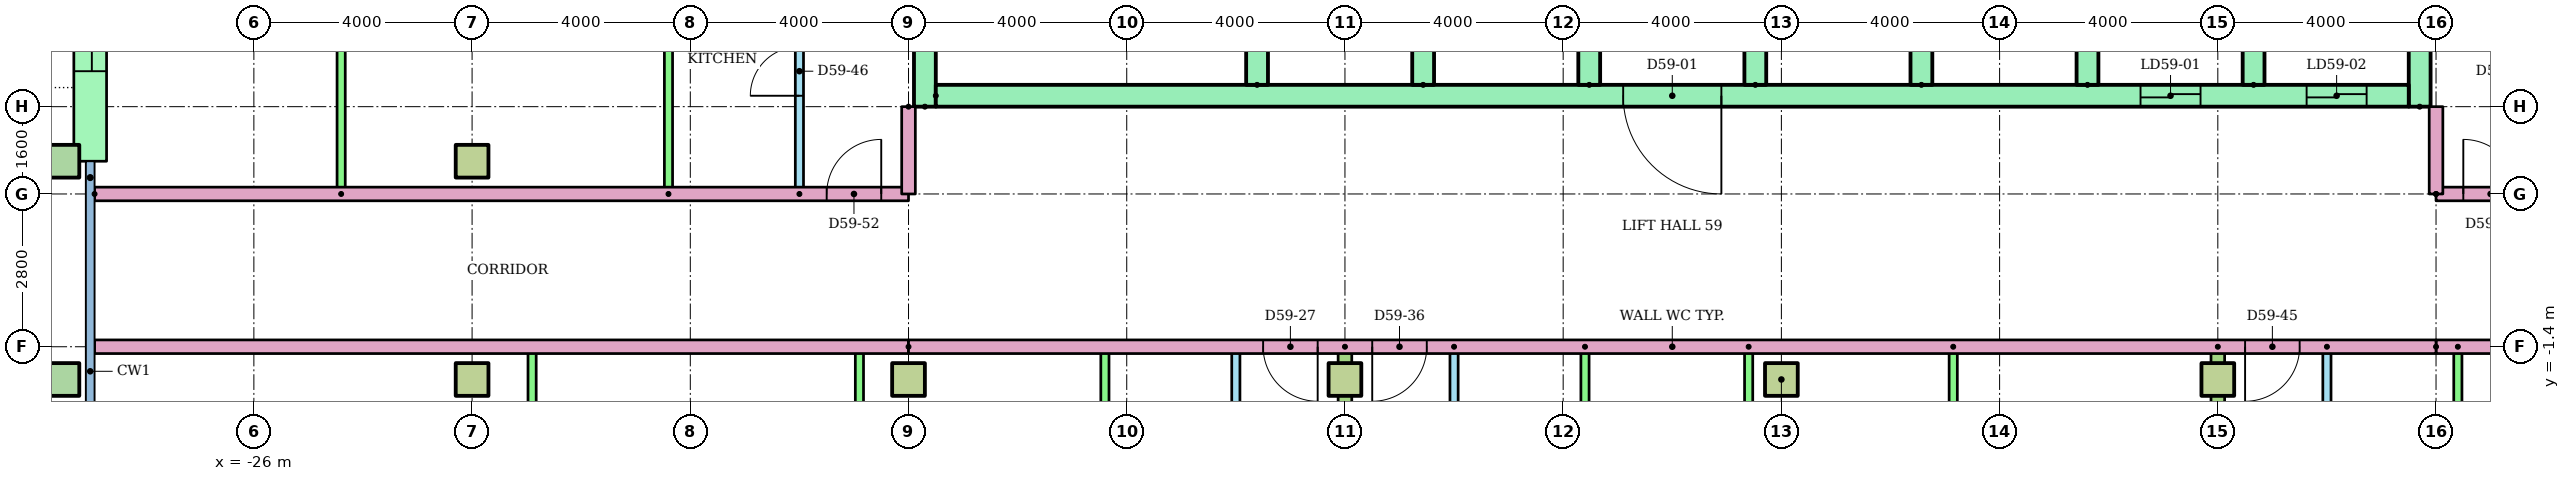
"""IFC4 building model, lengths in metres.
Left out: names, types, materials, properties, quantities, classifications, styles, units other than length and angle.
Written with IfcOpenShell. Run it as: python <this file> out.ifc"""

import sys

from ifc_helpers import new_model, si_unit, direction, frame, frame_2d, origin, origin_2d, place, context, subcontext, project, spatial, rectangle, hollow_rectangle, extrude, element, fill, save


model = new_model("IFC4")
c1 = context("Model", 3, precision=1e-05, world=origin(), true_north=direction((0.0, 1.0)))
c2 = subcontext(c1, "Body", "Model", "MODEL_VIEW")
j1 = project(units=[si_unit("LENGTHUNIT", "METRE"), si_unit("PLANEANGLEUNIT", "RADIAN")], contexts=[c1])
p1 = place(None, origin())
s1 = spatial("IfcSite", under=j1, at=p1, CompositionType="ELEMENT")
p2 = place(p1, origin())
s2 = spatial("IfcBuilding", under=s1, at=p2, CompositionType="ELEMENT")
p3 = place(p2, frame((0.0, 0.0, 226.8)))
s3 = spatial("IfcBuildingStorey", under=s2, at=p3, CompositionType="ELEMENT", Elevation=226.8)
p4 = place(p3, frame((-29.5, -2.0, 0.0)))
e1 = element("IfcColumn", 1, at=p4, inside=s3, PredefinedType="COLUMN", context=c2, shape_type="SweptSolid", body=[
    extrude(hollow_rectangle(XDim=0.6, YDim=0.6, WallThickness=0.03, at=origin_2d()), origin(), (0.0, 0.0, 1.0), 3.2),
])
for number, where in (
    (2, (-22.0, -2.0, 0.0)),
    (3, (-14.0, -2.0, 0.0)),
    (4, (-6.0, -2.0, 0.0)),
    (5, (2.0, -2.0, 0.0)),
    (6, (10.0, -2.0, 0.0)),
):
    element("IfcColumn", number, at=place(p3, frame(where)), inside=s3, PredefinedType="COLUMN", context=c2, shape_type="SweptSolid", body=[
        extrude(rectangle(XDim=0.6, YDim=0.6, at=origin_2d()), origin(), (0.0, 0.0, 1.0), 3.2),
    ])
p5 = place(p3, frame((-29.5, 2.0, 0.0)))
e7 = element("IfcColumn", 7, at=p5, inside=s3, PredefinedType="COLUMN", context=c2, shape_type="SweptSolid", body=[
    extrude(hollow_rectangle(XDim=0.6, YDim=0.6, WallThickness=0.03, at=origin_2d()), origin(), (0.0, 0.0, 1.0), 3.2),
])
p6 = place(p3, frame((-22.0, 2.0, 0.0)))
e8 = element("IfcColumn", 8, at=p6, inside=s3, PredefinedType="COLUMN", context=c2, shape_type="SweptSolid", body=[
    extrude(rectangle(XDim=0.6, YDim=0.6, at=origin_2d()), origin(), (0.0, 0.0, 1.0), 3.2),
])
p7 = place(p3, frame((-29.0, 6.5, 0.0), z_axis=(0.0, 0.0, 1.0), x_axis=(0.0, -1.0, 0.0)))
e9 = element("IfcWall", 9, at=p7, inside=s3, PredefinedType="STANDARD", context=c2, shape_type="SweptSolid", body=[
    extrude(rectangle(XDim=4.5, YDim=0.6, at=frame_2d((2.25, 0.0))), origin(), (0.0, 0.0, 1.0), 2.92),
])
p8 = place(p7, frame((1.65, 0.0, 0.0)))
e10 = element("IfcOpeningElement", 10, at=p8, cuts=e9, PredefinedType="OPENING", context=c2, shape_type="SweptSolid", body=[
    extrude(rectangle(XDim=1.2, YDim=2.1, at=frame_2d((0.6, 1.05))), frame((0.0, 0.31, 0.0), z_axis=(0.0, -1.0, 0.0), x_axis=(1.0, 0.0, 0.0)), (0.0, 0.0, 1.0), 0.62),
])
for number, where, z_axis, x_axis in (
    (11, (-13.7, 3.0, 0.0), (0.0, 0.0, 1.0), (0.0, 1.0, 0.0)),
    (12, (13.7, 3.0, 0.0), (0.0, 0.0, 1.0), (0.0, 1.0, 0.0)),
):
    element("IfcWall", number, at=place(p3, frame(where, z_axis=z_axis, x_axis=x_axis)), inside=s3, PredefinedType="SHEAR", context=c2, shape_type="SweptSolid", body=[
        extrude(rectangle(XDim=17.0, YDim=0.4, at=frame_2d((8.5, 0.0))), origin(), (0.0, 0.0, 1.0), 2.92),
    ])
p9 = place(p3, frame((-13.5, 3.2, 0.0)))
e13 = element("IfcWall", 13, at=p9, inside=s3, PredefinedType="SHEAR", context=c2, shape_type="SweptSolid", body=[
    extrude(rectangle(XDim=27.0, YDim=0.4, at=frame_2d((13.5, 0.0))), origin(), (0.0, 0.0, 1.0), 2.92),
])
p10 = place(p9, frame((22.083, 0.0, 0.0)))
e14 = element("IfcOpeningElement", 14, at=p10, cuts=e13, PredefinedType="OPENING", context=c2, shape_type="SweptSolid", body=[
    extrude(rectangle(XDim=1.1, YDim=2.1, at=frame_2d((0.55, 1.05))), frame((0.0, 0.21, 0.0), z_axis=(0.0, -1.0, 0.0), x_axis=(1.0, 0.0, 0.0)), (0.0, 0.0, 1.0), 0.42),
])
p11 = place(p9, frame((25.128, 0.0, 0.0)))
e15 = element("IfcOpeningElement", 15, at=p11, cuts=e13, PredefinedType="OPENING", context=c2, shape_type="SweptSolid", body=[
    extrude(rectangle(XDim=1.1, YDim=2.1, at=frame_2d((0.55, 1.05))), frame((0.0, 0.21, 0.0), z_axis=(0.0, -1.0, 0.0), x_axis=(1.0, 0.0, 0.0)), (0.0, 0.0, 1.0), 0.42),
])
p12 = place(p9, frame((12.6, 0.0, 0.0)))
e16 = element("IfcOpeningElement", 16, at=p12, cuts=e13, PredefinedType="OPENING", context=c2, shape_type="SweptSolid", body=[
    extrude(rectangle(XDim=1.8, YDim=2.1, at=frame_2d((0.9, 1.05))), frame((0.0, 0.21, 0.0), z_axis=(0.0, -1.0, 0.0), x_axis=(1.0, 0.0, 0.0)), (0.0, 0.0, 1.0), 0.42),
])
for number, where, z_axis, x_axis in (
    (17, (-7.611, 3.4, 0.0), (0.0, 0.0, 1.0), (0.0, 1.0, 0.0)),
    (18, (-4.567, 3.4, 0.0), (0.0, 0.0, 1.0), (0.0, 1.0, 0.0)),
    (19, (-1.522, 3.4, 0.0), (0.0, 0.0, 1.0), (0.0, 1.0, 0.0)),
    (20, (1.522, 3.4, 0.0), (0.0, 0.0, 1.0), (0.0, 1.0, 0.0)),
    (21, (4.567, 3.4, 0.0), (0.0, 0.0, 1.0), (0.0, 1.0, 0.0)),
    (22, (7.611, 3.4, 0.0), (0.0, 0.0, 1.0), (0.0, 1.0, 0.0)),
    (23, (10.656, 3.4, 0.0), (0.0, 0.0, 1.0), (0.0, 1.0, 0.0)),
):
    element("IfcWall", number, at=place(p3, frame(where, z_axis=z_axis, x_axis=x_axis)), inside=s3, PredefinedType="SHEAR", context=c2, shape_type="SweptSolid", body=[
        extrude(rectangle(XDim=3.0, YDim=0.4, at=frame_2d((1.5, 0.0))), origin(), (0.0, 0.0, 1.0), 2.92),
    ])
p13 = place(p3, frame((-8.0, -7.0, 0.0), z_axis=(0.0, 0.0, 1.0), x_axis=(0.0, 1.0, 0.0)))
e24 = element("IfcWall", 24, at=p13, inside=s3, PredefinedType="PARTITIONING", context=c2, shape_type="SweptSolid", body=[
    extrude(rectangle(XDim=5.6, YDim=0.15, at=frame_2d((2.8, 0.0))), origin(), (0.0, 0.0, 1.0), 2.4),
])
p14 = place(p13, frame((3.65, 0.0, 0.0)))
e25 = element("IfcOpeningElement", 25, at=p14, cuts=e24, PredefinedType="OPENING", context=c2, shape_type="SweptSolid", body=[
    extrude(rectangle(XDim=0.9, YDim=2.1, at=frame_2d((0.45, 1.05))), frame((0.0, 0.085, 0.0), z_axis=(0.0, -1.0, 0.0), x_axis=(1.0, 0.0, 0.0)), (0.0, 0.0, 1.0), 0.17),
])
p15 = place(p13, frame((0.9, 0.0, 0.0)))
e26 = element("IfcOpeningElement", 26, at=p15, cuts=e24, PredefinedType="OPENING", context=c2, shape_type="SweptSolid", body=[
    extrude(rectangle(XDim=0.8, YDim=2.1, at=frame_2d((0.4, 1.05))), frame((0.0, 0.085, 0.0), z_axis=(0.0, -1.0, 0.0), x_axis=(1.0, 0.0, 0.0)), (0.0, 0.0, 1.0), 0.17),
])
for number, where, z_axis, x_axis in (
    (27, (-10.4, -7.0, 0.0), (0.0, 0.0, 1.0), (0.0, 1.0, 0.0)),
    (28, (-14.9, -7.0, 0.0), (0.0, 0.0, 1.0), (0.0, 1.0, 0.0)),
    (29, (-20.9, -7.0, 0.0), (0.0, 0.0, 1.0), (0.0, 1.0, 0.0)),
):
    element("IfcWall", number, at=place(p3, frame(where, z_axis=z_axis, x_axis=x_axis)), inside=s3, PredefinedType="PARTITIONING", context=c2, shape_type="SweptSolid", body=[
        extrude(rectangle(XDim=5.6, YDim=0.15, at=frame_2d((2.8, 0.0))), origin(), (0.0, 0.0, 1.0), 2.4),
    ])
p16 = place(p3, frame((-4.0, -1.4, 0.0), z_axis=(0.0, 0.0, 1.0), x_axis=(0.0, -1.0, 0.0)))
e30 = element("IfcWall", 30, at=p16, inside=s3, PredefinedType="PARTITIONING", context=c2, shape_type="SweptSolid", body=[
    extrude(rectangle(XDim=5.6, YDim=0.15, at=frame_2d((2.8, 0.0))), origin(), (0.0, 0.0, 1.0), 2.4),
])
p17 = place(p16, frame((1.05, 0.0, 0.0)))
e31 = element("IfcOpeningElement", 31, at=p17, cuts=e30, PredefinedType="OPENING", context=c2, shape_type="SweptSolid", body=[
    extrude(rectangle(XDim=0.9, YDim=2.1, at=frame_2d((0.45, 1.05))), frame((0.0, 0.085, 0.0), z_axis=(0.0, -1.0, 0.0), x_axis=(1.0, 0.0, 0.0)), (0.0, 0.0, 1.0), 0.17),
])
p18 = place(p16, frame((3.9, 0.0, 0.0)))
e32 = element("IfcOpeningElement", 32, at=p18, cuts=e30, PredefinedType="OPENING", context=c2, shape_type="SweptSolid", body=[
    extrude(rectangle(XDim=0.8, YDim=2.1, at=frame_2d((0.4, 1.05))), frame((0.0, 0.085, 0.0), z_axis=(0.0, -1.0, 0.0), x_axis=(1.0, 0.0, 0.0)), (0.0, 0.0, 1.0), 0.17),
])
for number, where, z_axis, x_axis in (
    (33, (-1.6, -1.4, 0.0), (0.0, 0.0, 1.0), (0.0, -1.0, 0.0)),
    (34, (1.4, -1.4, 0.0), (0.0, 0.0, 1.0), (0.0, -1.0, 0.0)),
    (35, (5.15, -1.4, 0.0), (0.0, 0.0, 1.0), (0.0, -1.0, 0.0)),
):
    element("IfcWall", number, at=place(p3, frame(where, z_axis=z_axis, x_axis=x_axis)), inside=s3, PredefinedType="PARTITIONING", context=c2, shape_type="SweptSolid", body=[
        extrude(rectangle(XDim=5.6, YDim=0.15, at=frame_2d((2.8, 0.0))), origin(), (0.0, 0.0, 1.0), 2.4),
    ])
p19 = place(p3, frame((-6.0, -1.4, 0.0), z_axis=(0.0, 0.0, 1.0), x_axis=(0.0, -1.0, 0.0)))
e36 = element("IfcWall", 36, at=p19, inside=s3, PredefinedType="PARTITIONING", context=c2, shape_type="SweptSolid", body=[
    extrude(rectangle(XDim=15.11, YDim=0.25, at=frame_2d((7.555, 0.0))), origin(), (0.0, 0.0, 1.0), 2.4),
])
p20 = place(p3, frame((12.0, -1.4, 0.0), z_axis=(0.0, 0.0, 1.0), x_axis=(0.0, -1.0, 0.0)))
e37 = element("IfcWall", 37, at=p20, inside=s3, PredefinedType="PARTITIONING", context=c2, shape_type="SweptSolid", body=[
    extrude(rectangle(XDim=5.6, YDim=0.15, at=frame_2d((2.8, 0.0))), origin(), (0.0, 0.0, 1.0), 2.4),
])
p21 = place(p20, frame((1.05, 0.0, 0.0)))
e38 = element("IfcOpeningElement", 38, at=p21, cuts=e37, PredefinedType="OPENING", context=c2, shape_type="SweptSolid", body=[
    extrude(rectangle(XDim=0.9, YDim=2.1, at=frame_2d((0.45, 1.05))), frame((0.0, 0.085, 0.0), z_axis=(0.0, -1.0, 0.0), x_axis=(1.0, 0.0, 0.0)), (0.0, 0.0, 1.0), 0.17),
])
p22 = place(p20, frame((3.9, 0.0, 0.0)))
e39 = element("IfcOpeningElement", 39, at=p22, cuts=e37, PredefinedType="OPENING", context=c2, shape_type="SweptSolid", body=[
    extrude(rectangle(XDim=0.8, YDim=2.1, at=frame_2d((0.4, 1.05))), frame((0.0, 0.085, 0.0), z_axis=(0.0, -1.0, 0.0), x_axis=(1.0, 0.0, 0.0)), (0.0, 0.0, 1.0), 0.17),
])
p23 = place(p3, frame((14.4, -1.4, 0.0), z_axis=(0.0, 0.0, 1.0), x_axis=(0.0, -1.0, 0.0)))
e40 = element("IfcWall", 40, at=p23, inside=s3, PredefinedType="PARTITIONING", context=c2, shape_type="SweptSolid", body=[
    extrude(rectangle(XDim=5.6, YDim=0.15, at=frame_2d((2.8, 0.0))), origin(), (0.0, 0.0, 1.0), 2.4),
])
p24 = place(p3, frame((10.0, -1.4, 0.0), z_axis=(0.0, 0.0, 1.0), x_axis=(0.0, -1.0, 0.0)))
e41 = element("IfcWall", 41, at=p24, inside=s3, PredefinedType="PARTITIONING", context=c2, shape_type="SweptSolid", body=[
    extrude(rectangle(XDim=15.11, YDim=0.25, at=frame_2d((7.555, 0.0))), origin(), (0.0, 0.0, 1.0), 2.4),
])
for number, where, z_axis, x_axis in (
    (42, (-14.0, -1.4, 0.0), (0.0, 0.0, 1.0), (-1.0, 0.0, 0.0)),
    (43, (28.92, -1.4, 0.0), (0.0, 0.0, 1.0), (-1.0, 0.0, 0.0)),
):
    element("IfcWall", number, at=place(p3, frame(where, z_axis=z_axis, x_axis=x_axis)), inside=s3, PredefinedType="PARTITIONING", context=c2, shape_type="SweptSolid", body=[
        extrude(rectangle(XDim=14.92, YDim=0.25, at=frame_2d((7.46, 0.0))), origin(), (0.0, 0.0, 1.0), 2.4),
    ])
p25 = place(p3, frame((-16.0, 1.4, 0.0), z_axis=(0.0, 0.0, 1.0), x_axis=(0.0, 1.0, 0.0)))
e44 = element("IfcWall", 44, at=p25, inside=s3, PredefinedType="PARTITIONING", context=c2, shape_type="SweptSolid", body=[
    extrude(rectangle(XDim=8.0, YDim=0.15, at=frame_2d((4.0, 0.0))), origin(), (0.0, 0.0, 1.0), 2.4),
])
p26 = place(p25, frame((1.8, 0.0, 0.0)))
e45 = element("IfcOpeningElement", 45, at=p26, cuts=e44, PredefinedType="OPENING", context=c2, shape_type="SweptSolid", body=[
    extrude(rectangle(XDim=0.9, YDim=2.1, at=frame_2d((0.45, 1.05))), frame((0.0, 0.085, 0.0), z_axis=(0.0, -1.0, 0.0), x_axis=(1.0, 0.0, 0.0)), (0.0, 0.0, 1.0), 0.17),
])
p27 = place(p25, frame((5.85, 0.0, 0.0)))
e46 = element("IfcOpeningElement", 46, at=p27, cuts=e44, PredefinedType="OPENING", context=c2, shape_type="SweptSolid", body=[
    extrude(rectangle(XDim=0.8, YDim=2.1, at=frame_2d((0.4, 1.05))), frame((0.0, 0.085, 0.0), z_axis=(0.0, -1.0, 0.0), x_axis=(1.0, 0.0, 0.0)), (0.0, 0.0, 1.0), 0.17),
])
for number, where, z_axis, x_axis in (
    (47, (-18.4, 1.4, 0.0), (0.0, 0.0, 1.0), (0.0, 1.0, 0.0)),
    (48, (-24.4, 1.4, 0.0), (0.0, 0.0, 1.0), (0.0, 1.0, 0.0)),
):
    element("IfcWall", number, at=place(p3, frame(where, z_axis=z_axis, x_axis=x_axis)), inside=s3, PredefinedType="PARTITIONING", context=c2, shape_type="SweptSolid", body=[
        extrude(rectangle(XDim=8.0, YDim=0.15, at=frame_2d((4.0, 0.0))), origin(), (0.0, 0.0, 1.0), 2.4),
    ])
p28 = place(p3, frame((-28.92, 1.4, 0.0)))
e49 = element("IfcWall", 49, at=p28, inside=s3, PredefinedType="PARTITIONING", context=c2, shape_type="SweptSolid", body=[
    extrude(rectangle(XDim=14.92, YDim=0.25, at=frame_2d((7.46, 0.0))), origin(), (0.0, 0.0, 1.0), 2.4),
])
p29 = place(p28, frame((13.42, 0.0, 0.0)))
e50 = element("IfcOpeningElement", 50, at=p29, cuts=e49, PredefinedType="OPENING", context=c2, shape_type="SweptSolid", body=[
    extrude(rectangle(XDim=1.0, YDim=2.1, at=frame_2d((0.5, 1.05))), frame((0.0, 0.135, 0.0), z_axis=(0.0, -1.0, 0.0), x_axis=(1.0, 0.0, 0.0)), (0.0, 0.0, 1.0), 0.27),
])
p30 = place(p3, frame((14.0, 1.4, 0.0)))
e51 = element("IfcWall", 51, at=p30, inside=s3, PredefinedType="PARTITIONING", context=c2, shape_type="SweptSolid", body=[
    extrude(rectangle(XDim=14.92, YDim=0.25, at=frame_2d((7.46, 0.0))), origin(), (0.0, 0.0, 1.0), 2.4),
])
p31 = place(p30, frame((0.5, 0.0, 0.0)))
e52 = element("IfcOpeningElement", 52, at=p31, cuts=e51, PredefinedType="OPENING", context=c2, shape_type="SweptSolid", body=[
    extrude(rectangle(XDim=1.0, YDim=2.1, at=frame_2d((0.5, 1.05))), frame((0.0, 0.135, 0.0), z_axis=(0.0, -1.0, 0.0), x_axis=(1.0, 0.0, 0.0)), (0.0, 0.0, 1.0), 0.27),
])
p32 = place(p3, frame((14.0, -1.4, 0.0), z_axis=(0.0, 0.0, 1.0), x_axis=(-1.0, 0.0, 0.0)))
e53 = element("IfcWall", 53, at=p32, inside=s3, PredefinedType="PARTITIONING", context=c2, shape_type="SweptSolid", body=[
    extrude(rectangle(XDim=28.0, YDim=0.25, at=frame_2d((14.0, 0.0))), origin(), (0.0, 0.0, 1.0), 2.4),
])
p33 = place(p32, frame((20.5, 0.0, 0.0)))
e54 = element("IfcOpeningElement", 54, at=p33, cuts=e53, PredefinedType="OPENING", context=c2, shape_type="SweptSolid", body=[
    extrude(rectangle(XDim=1.0, YDim=2.1, at=frame_2d((0.5, 1.05))), frame((0.0, 0.135, 0.0), z_axis=(0.0, -1.0, 0.0), x_axis=(1.0, 0.0, 0.0)), (0.0, 0.0, 1.0), 0.27),
])
p34 = place(p32, frame((18.5, 0.0, 0.0)))
e55 = element("IfcOpeningElement", 55, at=p34, cuts=e53, PredefinedType="OPENING", context=c2, shape_type="SweptSolid", body=[
    extrude(rectangle(XDim=1.0, YDim=2.1, at=frame_2d((0.5, 1.05))), frame((0.0, 0.135, 0.0), z_axis=(0.0, -1.0, 0.0), x_axis=(1.0, 0.0, 0.0)), (0.0, 0.0, 1.0), 0.27),
])
p35 = place(p32, frame((2.5, 0.0, 0.0)))
e56 = element("IfcOpeningElement", 56, at=p35, cuts=e53, PredefinedType="OPENING", context=c2, shape_type="SweptSolid", body=[
    extrude(rectangle(XDim=1.0, YDim=2.1, at=frame_2d((0.5, 1.05))), frame((0.0, 0.135, 0.0), z_axis=(0.0, -1.0, 0.0), x_axis=(1.0, 0.0, 0.0)), (0.0, 0.0, 1.0), 0.27),
])
for number, where, z_axis, x_axis in (
    (57, (-14.0, 3.0, 0.0), (0.0, 0.0, 1.0), (0.0, -1.0, 0.0)),
    (58, (14.0, 1.4, 0.0), (0.0, 0.0, 1.0), (0.0, 1.0, 0.0)),
):
    element("IfcWall", number, at=place(p3, frame(where, z_axis=z_axis, x_axis=x_axis)), inside=s3, PredefinedType="PARTITIONING", context=c2, shape_type="SweptSolid", body=[
        extrude(rectangle(XDim=1.6, YDim=0.25, at=frame_2d((0.8, 0.0))), origin(), (0.0, 0.0, 1.0), 2.4),
    ])
p36 = place(p10, origin())
e59 = element("IfcDoor", 59, at=p36, inside=s3, OperationType="SLIDING_TO_LEFT", PredefinedType="DOOR", context=c2, shape_type="SweptSolid", body=[
    extrude(rectangle(XDim=1.1, YDim=2.1, at=frame_2d((0.55, 1.05))), frame((0.0, 0.025, 0.0), z_axis=(0.0, -1.0, 0.0), x_axis=(1.0, 0.0, 0.0)), (0.0, 0.0, 1.0), 0.05),
])
fill(e14, e59)
p37 = place(p11, origin())
e60 = element("IfcDoor", 60, at=p37, inside=s3, OperationType="SLIDING_TO_LEFT", PredefinedType="DOOR", context=c2, shape_type="SweptSolid", body=[
    extrude(rectangle(XDim=1.1, YDim=2.1, at=frame_2d((0.55, 1.05))), frame((0.0, 0.025, 0.0), z_axis=(0.0, -1.0, 0.0), x_axis=(1.0, 0.0, 0.0)), (0.0, 0.0, 1.0), 0.05),
])
fill(e15, e60)
p38 = place(p12, frame((1.8, 0.0, 0.0), z_axis=(0.0, 0.0, 1.0), x_axis=(-1.0, 0.0, 0.0)))
e61 = element("IfcDoor", 61, at=p38, inside=s3, OperationType="DOUBLE_DOOR_SINGLE_SWING", PredefinedType="DOOR", context=c2, shape_type="SweptSolid", body=[
    extrude(rectangle(XDim=1.8, YDim=2.1, at=frame_2d((0.9, 1.05))), frame((0.0, 0.025, 0.0), z_axis=(0.0, -1.0, 0.0), x_axis=(1.0, 0.0, 0.0)), (0.0, 0.0, 1.0), 0.05),
])
fill(e16, e61)
p39 = place(p33, origin())
e62 = element("IfcDoor", 62, at=p39, inside=s3, OperationType="SINGLE_SWING_LEFT", PredefinedType="DOOR", context=c2, shape_type="SweptSolid", body=[
    extrude(rectangle(XDim=1.0, YDim=2.1, at=frame_2d((0.5, 1.05))), frame((0.0, 0.025, 0.0), z_axis=(0.0, -1.0, 0.0), x_axis=(1.0, 0.0, 0.0)), (0.0, 0.0, 1.0), 0.05),
])
fill(e54, e62)
p40 = place(p34, origin())
e63 = element("IfcDoor", 63, at=p40, inside=s3, OperationType="SINGLE_SWING_RIGHT", PredefinedType="DOOR", context=c2, shape_type="SweptSolid", body=[
    extrude(rectangle(XDim=1.0, YDim=2.1, at=frame_2d((0.5, 1.05))), frame((0.0, 0.025, 0.0), z_axis=(0.0, -1.0, 0.0), x_axis=(1.0, 0.0, 0.0)), (0.0, 0.0, 1.0), 0.05),
])
fill(e55, e63)
p41 = place(p35, origin())
e64 = element("IfcDoor", 64, at=p41, inside=s3, OperationType="SINGLE_SWING_RIGHT", PredefinedType="DOOR", context=c2, shape_type="SweptSolid", body=[
    extrude(rectangle(XDim=1.0, YDim=2.1, at=frame_2d((0.5, 1.05))), frame((0.0, 0.025, 0.0), z_axis=(0.0, -1.0, 0.0), x_axis=(1.0, 0.0, 0.0)), (0.0, 0.0, 1.0), 0.05),
])
fill(e56, e64)
p42 = place(p26, origin())
e65 = element("IfcDoor", 65, at=p42, inside=s3, OperationType="SINGLE_SWING_LEFT", PredefinedType="DOOR", context=c2, shape_type="SweptSolid", body=[
    extrude(rectangle(XDim=0.9, YDim=2.1, at=frame_2d((0.45, 1.05))), frame((0.0, 0.025, 0.0), z_axis=(0.0, -1.0, 0.0), x_axis=(1.0, 0.0, 0.0)), (0.0, 0.0, 1.0), 0.05),
])
fill(e45, e65)
p43 = place(p29, origin())
e66 = element("IfcDoor", 66, at=p43, inside=s3, OperationType="SINGLE_SWING_RIGHT", PredefinedType="DOOR", context=c2, shape_type="SweptSolid", body=[
    extrude(rectangle(XDim=1.0, YDim=2.1, at=frame_2d((0.5, 1.05))), frame((0.0, 0.025, 0.0), z_axis=(0.0, -1.0, 0.0), x_axis=(1.0, 0.0, 0.0)), (0.0, 0.0, 1.0), 0.05),
])
fill(e50, e66)
p44 = place(p31, origin())
e67 = element("IfcDoor", 67, at=p44, inside=s3, OperationType="SINGLE_SWING_LEFT", PredefinedType="DOOR", context=c2, shape_type="SweptSolid", body=[
    extrude(rectangle(XDim=1.0, YDim=2.1, at=frame_2d((0.5, 1.05))), frame((0.0, 0.025, 0.0), z_axis=(0.0, -1.0, 0.0), x_axis=(1.0, 0.0, 0.0)), (0.0, 0.0, 1.0), 0.05),
])
fill(e52, e67)
p45 = place(p8, origin())
e68 = element("IfcDoor", 68, at=p45, inside=s3, OperationType="SLIDING_TO_LEFT", PredefinedType="DOOR", context=c2, shape_type="SweptSolid", body=[
    extrude(rectangle(XDim=1.2, YDim=2.1, at=frame_2d((0.6, 1.05))), frame((0.0, 0.025, 0.0), z_axis=(0.0, -1.0, 0.0), x_axis=(1.0, 0.0, 0.0)), (0.0, 0.0, 1.0), 0.05),
])
fill(e10, e68)
save(model, sys.argv[1])
